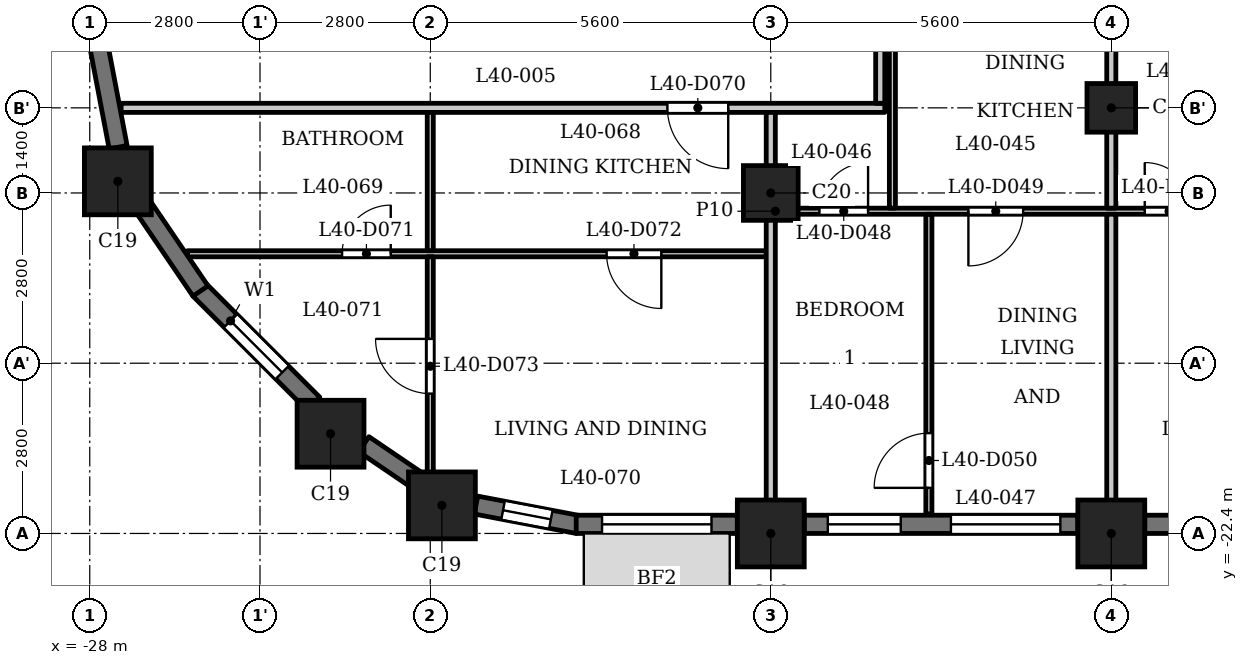
"""IFC4 building model, lengths in metres.
Left out: names, types, materials, properties, quantities, classifications, styles, units other than length and angle.
Written with IfcOpenShell. Run it as: python <this file> out.ifc"""

import sys

from ifc_helpers import new_model, si_unit, direction, frame, frame_2d, origin, origin_2d, place, context, subcontext, project, spatial, rectangle, extrude, element, fill, save


model = new_model("IFC4")
c1 = context("Model", 3, precision=1e-05, world=origin(), true_north=direction((0.0, 1.0)))
c2 = subcontext(c1, "Body", "Model", "MODEL_VIEW")
j1 = project(units=[si_unit("LENGTHUNIT", "METRE"), si_unit("PLANEANGLEUNIT", "RADIAN")], contexts=[c1])
p1 = place(None, origin())
s1 = spatial("IfcSite", under=j1, at=p1, CompositionType="ELEMENT")
p2 = place(p1, origin())
s2 = spatial("IfcBuilding", under=s1, at=p2, CompositionType="ELEMENT")
p3 = place(p2, frame((0.0, 0.0, 157.1)))
s3 = spatial("IfcBuildingStorey", under=s2, at=p3, CompositionType="ELEMENT", Elevation=157.1)
for number, where, z_axis, x_axis in (
    (1, (-22.209, -21.938, 0.0), (0.0, 0.0, 1.0), (1.0, 0.0, 0.0)),
    (2, (-16.8, -22.4, 0.0), (0.0, 0.0, 1.0), (1.0, 0.0, 0.0)),
    (3, (-11.2, -22.4, 0.0), (0.0, 0.0, 1.0), (1.0, 0.0, 0.0)),
    (4, (-27.538, -16.609, 0.0), (0.0, 0.0, 1.0), (1.0, 0.0, 0.0)),
    (5, (-24.04, -20.76, 0.0), (0.0, 0.0, 1.0), (1.0, 0.0, 0.0)),
):
    element("IfcColumn", number, at=place(p3, frame(where, z_axis=z_axis, x_axis=x_axis)), inside=s3, PredefinedType="COLUMN", context=c2, shape_type="SweptSolid", body=[
        extrude(rectangle(XDim=1.1, YDim=1.1, at=origin_2d()), origin(), (0.0, 0.0, 1.0), 3.5),
    ])
p4 = place(p3, frame((-16.8, -16.8, 0.0), z_axis=(0.0, 0.0, 1.0), x_axis=(1.0, 0.0, 0.0)))
e6 = element("IfcColumn", 6, at=p4, inside=s3, PredefinedType="COLUMN", context=c2, shape_type="SweptSolid", body=[
    extrude(rectangle(XDim=0.9, YDim=0.9, at=origin_2d()), origin(), (0.0, 0.0, 1.0), 3.5),
])
p5 = place(p3, frame((-11.2, -15.4, 0.0), z_axis=(0.0, 0.0, 1.0), x_axis=(1.0, 0.0, 0.0)))
e7 = element("IfcColumn", 7, at=p5, inside=s3, PredefinedType="COLUMN", context=c2, shape_type="SweptSolid", body=[
    extrude(rectangle(XDim=0.8, YDim=0.8, at=origin_2d()), origin(), (0.0, 0.0, 1.0), 3.5),
])
p6 = place(p3, frame((-26.197, -18.391, 0.0), z_axis=(0.0, 0.0, 1.0), x_axis=(0.707060717099, -0.707152842274, 0.0)))
e8 = element("IfcWall", 8, at=p6, inside=s3, PredefinedType="SOLIDWALL", context=c2, shape_type="SweptSolid", body=[
    extrude(rectangle(XDim=2.65, YDim=0.3, at=frame_2d((1.325, 0.0))), origin(), (0.0, 0.0, 1.0), 2.45),
])
p7 = place(p6, frame((0.725, 0.0, 0.6)))
e9 = element("IfcOpeningElement", 9, at=p7, cuts=e8, PredefinedType="OPENING", context=c2, shape_type="SweptSolid", body=[
    extrude(rectangle(XDim=1.2, YDim=1.55, at=frame_2d((0.6, 0.775))), frame((0.0, 0.16, 0.0), z_axis=(0.0, -1.0, 0.0), x_axis=(1.0, 0.0, 0.0)), (0.0, 0.0, 1.0), 0.32),
])
p8 = place(p3, frame((-23.492, -20.932, 0.0), z_axis=(0.0, 0.0, 1.0), x_axis=(0.826993959827, -0.562210806023, 0.0)))
e10 = element("IfcWall", 10, at=p8, inside=s3, PredefinedType="SOLIDWALL", context=c2, shape_type="SweptSolid", body=[
    extrude(rectangle(XDim=1.077, YDim=0.3, at=frame_2d((0.539, 0.0))), origin(), (0.0, 0.0, 1.0), 3.2),
])
p9 = place(p3, frame((-21.648, -21.933, 0.0), z_axis=(0.0, 0.0, 1.0), x_axis=(0.982297206936, -0.187329114784, 0.0)))
e11 = element("IfcWall", 11, at=p9, inside=s3, PredefinedType="SOLIDWALL", context=c2, shape_type="SweptSolid", body=[
    extrude(rectangle(XDim=1.706, YDim=0.3, at=frame_2d((0.853, 0.0))), origin(), (0.0, 0.0, 1.0), 2.45),
])
p10 = place(p9, frame((0.453, 0.0, 0.6)))
e12 = element("IfcOpeningElement", 12, at=p10, cuts=e11, PredefinedType="OPENING", context=c2, shape_type="SweptSolid", body=[
    extrude(rectangle(XDim=0.8, YDim=1.55, at=frame_2d((0.4, 0.775))), frame((0.0, 0.16, 0.0), z_axis=(0.0, -1.0, 0.0), x_axis=(1.0, 0.0, 0.0)), (0.0, 0.0, 1.0), 0.32),
])
p11 = place(p3, frame((-20.0, -22.25, 0.0), z_axis=(0.0, 0.0, 1.0), x_axis=(1.0, 0.0, 0.0)))
e13 = element("IfcWall", 13, at=p11, inside=s3, PredefinedType="SOLIDWALL", context=c2, shape_type="SweptSolid", body=[
    extrude(rectangle(XDim=2.65, YDim=0.3, at=frame_2d((1.325, 0.0))), origin(), (0.0, 0.0, 1.0), 2.45),
])
p12 = place(p11, frame((0.425, 0.0, 0.9)))
e14 = element("IfcOpeningElement", 14, at=p12, cuts=e13, PredefinedType="OPENING", context=c2, shape_type="SweptSolid", body=[
    extrude(rectangle(XDim=1.8, YDim=1.25, at=frame_2d((0.9, 0.625))), frame((0.0, 0.16, 0.0), z_axis=(0.0, -1.0, 0.0), x_axis=(1.0, 0.0, 0.0)), (0.0, 0.0, 1.0), 0.32),
])
p13 = place(p3, frame((-16.25, -22.25, 0.0), z_axis=(0.0, 0.0, 1.0), x_axis=(1.0, 0.0, 0.0)))
e15 = element("IfcWall", 15, at=p13, inside=s3, PredefinedType="SOLIDWALL", context=c2, shape_type="SweptSolid", body=[
    extrude(rectangle(XDim=4.5, YDim=0.3, at=frame_2d((2.25, 0.0))), origin(), (0.0, 0.0, 1.0), 2.45),
])
p14 = place(p13, frame((0.387, 0.0, 0.6)))
e16 = element("IfcOpeningElement", 16, at=p14, cuts=e15, PredefinedType="OPENING", context=c2, shape_type="SweptSolid", body=[
    extrude(rectangle(XDim=1.2, YDim=1.55, at=frame_2d((0.6, 0.775))), frame((0.0, 0.16, 0.0), z_axis=(0.0, -1.0, 0.0), x_axis=(1.0, 0.0, 0.0)), (0.0, 0.0, 1.0), 0.32),
])
p15 = place(p13, frame((2.413, 0.0, 0.9)))
e17 = element("IfcOpeningElement", 17, at=p15, cuts=e15, PredefinedType="OPENING", context=c2, shape_type="SweptSolid", body=[
    extrude(rectangle(XDim=1.8, YDim=1.25, at=frame_2d((0.9, 0.625))), frame((0.0, 0.16, 0.0), z_axis=(0.0, -1.0, 0.0), x_axis=(1.0, 0.0, 0.0)), (0.0, 0.0, 1.0), 0.32),
])
p16 = place(p3, frame((-10.65, -22.25, 0.0), z_axis=(0.0, 0.0, 1.0), x_axis=(1.0, 0.0, 0.0)))
e18 = element("IfcWall", 18, at=p16, inside=s3, PredefinedType="SOLIDWALL", context=c2, shape_type="SweptSolid", body=[
    extrude(rectangle(XDim=4.5, YDim=0.3, at=frame_2d((2.25, 0.0))), origin(), (0.0, 0.0, 1.0), 2.45),
])
p17 = place(p16, frame((0.45, 0.0, 1.2)))
e19 = element("IfcOpeningElement", 19, at=p17, cuts=e18, PredefinedType="OPENING", context=c2, shape_type="SweptSolid", body=[
    extrude(rectangle(XDim=3.6, YDim=0.95, at=frame_2d((1.8, 0.475))), frame((0.0, 0.16, 0.0), z_axis=(0.0, -1.0, 0.0), x_axis=(1.0, 0.0, 0.0)), (0.0, 0.0, 1.0), 0.32),
])
p18 = place(p3, frame((-27.853, -14.372, 0.0), z_axis=(0.0, 0.0, 1.0), x_axis=(0.187302784601, -0.982302227871, 0.0)))
e20 = element("IfcWall", 20, at=p18, inside=s3, PredefinedType="SOLIDWALL", context=c2, shape_type="SweptSolid", body=[
    extrude(rectangle(XDim=1.706, YDim=0.3, at=frame_2d((0.853, 0.0))), origin(), (0.0, 0.0, 1.0), 2.45),
])
p19 = place(p3, frame((-27.138, -17.002, 0.0), z_axis=(0.0, 0.0, 1.0), x_axis=(0.562075160946, -0.827086158419, 0.0)))
e21 = element("IfcWall", 21, at=p19, inside=s3, PredefinedType="SOLIDWALL", context=c2, shape_type="SweptSolid", body=[
    extrude(rectangle(XDim=1.706, YDim=0.3, at=frame_2d((0.853, 0.0))), origin(), (0.0, 0.0, 1.0), 2.45),
])
p20 = place(p3, frame((-26.394, -17.8, 0.0), z_axis=(0.0, 0.0, 1.0), x_axis=(1.0, 0.0, 0.0)))
e22 = element("IfcWall", 22, at=p20, inside=s3, PredefinedType="PARTITIONING", context=c2, shape_type="SweptSolid", body=[
    extrude(rectangle(XDim=9.519, YDim=0.1, at=frame_2d((4.76, 0.0))), origin(), (0.0, 0.0, 1.0), 3.2),
])
p21 = place(p20, frame((2.544, 0.0, 0.0)))
e23 = element("IfcOpeningElement", 23, at=p21, cuts=e22, PredefinedType="OPENING", context=c2, shape_type="SweptSolid", body=[
    extrude(rectangle(XDim=0.8, YDim=2.1, at=frame_2d((0.4, 1.05))), frame((0.0, 0.06, 0.0), z_axis=(0.0, -1.0, 0.0), x_axis=(1.0, 0.0, 0.0)), (0.0, 0.0, 1.0), 0.12),
])
p22 = place(p20, frame((6.894, 0.0, 0.0)))
e24 = element("IfcOpeningElement", 24, at=p22, cuts=e22, PredefinedType="OPENING", context=c2, shape_type="SweptSolid", body=[
    extrude(rectangle(XDim=0.9, YDim=2.1, at=frame_2d((0.45, 1.05))), frame((0.0, 0.06, 0.0), z_axis=(0.0, -1.0, 0.0), x_axis=(1.0, 0.0, 0.0)), (0.0, 0.0, 1.0), 0.12),
])
p23 = place(p3, frame((-16.725, -17.1, 0.0), z_axis=(0.0, 0.0, 1.0), x_axis=(1.0, 0.0, 0.0)))
e25 = element("IfcWall", 25, at=p23, inside=s3, PredefinedType="PARTITIONING", context=c2, shape_type="SweptSolid", body=[
    extrude(rectangle(XDim=33.45, YDim=0.1, at=frame_2d((16.725, 0.0))), origin(), (0.0, 0.0, 1.0), 3.2),
])
p24 = place(p23, frame((0.725, 0.0, 0.0)))
e26 = element("IfcOpeningElement", 26, at=p24, cuts=e25, PredefinedType="OPENING", context=c2, shape_type="SweptSolid", body=[
    extrude(rectangle(XDim=0.8, YDim=2.1, at=frame_2d((0.4, 1.05))), frame((0.0, 0.06, 0.0), z_axis=(0.0, -1.0, 0.0), x_axis=(1.0, 0.0, 0.0)), (0.0, 0.0, 1.0), 0.12),
])
p25 = place(p23, frame((3.175, 0.0, 0.0)))
e27 = element("IfcOpeningElement", 27, at=p25, cuts=e25, PredefinedType="OPENING", context=c2, shape_type="SweptSolid", body=[
    extrude(rectangle(XDim=0.9, YDim=2.1, at=frame_2d((0.45, 1.05))), frame((0.0, 0.06, 0.0), z_axis=(0.0, -1.0, 0.0), x_axis=(1.0, 0.0, 0.0)), (0.0, 0.0, 1.0), 0.12),
])
p26 = place(p23, frame((6.075, 0.0, 0.0)))
e28 = element("IfcOpeningElement", 28, at=p26, cuts=e25, PredefinedType="OPENING", context=c2, shape_type="SweptSolid", body=[
    extrude(rectangle(XDim=0.8, YDim=2.1, at=frame_2d((0.4, 1.05))), frame((0.0, 0.06, 0.0), z_axis=(0.0, -1.0, 0.0), x_axis=(1.0, 0.0, 0.0)), (0.0, 0.0, 1.0), 0.12),
])
p27 = place(p23, frame((9.425, 0.0, 0.0)))
e29 = element("IfcOpeningElement", 29, at=p27, cuts=e25, PredefinedType="OPENING", context=c2, shape_type="SweptSolid", body=[
    extrude(rectangle(XDim=0.9, YDim=2.1, at=frame_2d((0.45, 1.05))), frame((0.0, 0.06, 0.0), z_axis=(0.0, -1.0, 0.0), x_axis=(1.0, 0.0, 0.0)), (0.0, 0.0, 1.0), 0.12),
])
p28 = place(p23, frame((12.675, 0.0, 0.0)))
e30 = element("IfcOpeningElement", 30, at=p28, cuts=e25, PredefinedType="OPENING", context=c2, shape_type="SweptSolid", body=[
    extrude(rectangle(XDim=0.8, YDim=2.1, at=frame_2d((0.4, 1.05))), frame((0.0, 0.06, 0.0), z_axis=(0.0, -1.0, 0.0), x_axis=(1.0, 0.0, 0.0)), (0.0, 0.0, 1.0), 0.12),
])
p29 = place(p23, frame((15.275, 0.0, 0.0)))
e31 = element("IfcOpeningElement", 31, at=p29, cuts=e25, PredefinedType="OPENING", context=c2, shape_type="SweptSolid", body=[
    extrude(rectangle(XDim=0.9, YDim=2.1, at=frame_2d((0.45, 1.05))), frame((0.0, 0.06, 0.0), z_axis=(0.0, -1.0, 0.0), x_axis=(1.0, 0.0, 0.0)), (0.0, 0.0, 1.0), 0.12),
])
p30 = place(p23, frame((20.625, 0.0, 0.0)))
e32 = element("IfcOpeningElement", 32, at=p30, cuts=e25, PredefinedType="OPENING", context=c2, shape_type="SweptSolid", body=[
    extrude(rectangle(XDim=0.8, YDim=2.1, at=frame_2d((0.4, 1.05))), frame((0.0, 0.06, 0.0), z_axis=(0.0, -1.0, 0.0), x_axis=(1.0, 0.0, 0.0)), (0.0, 0.0, 1.0), 0.12),
])
p31 = place(p23, frame((17.375, 0.0, 0.0)))
e33 = element("IfcOpeningElement", 33, at=p31, cuts=e25, PredefinedType="OPENING", context=c2, shape_type="SweptSolid", body=[
    extrude(rectangle(XDim=0.9, YDim=2.1, at=frame_2d((0.45, 1.05))), frame((0.0, 0.06, 0.0), z_axis=(0.0, -1.0, 0.0), x_axis=(1.0, 0.0, 0.0)), (0.0, 0.0, 1.0), 0.12),
])
p32 = place(p23, frame((31.075, 0.0, 0.0)))
e34 = element("IfcOpeningElement", 34, at=p32, cuts=e25, PredefinedType="OPENING", context=c2, shape_type="SweptSolid", body=[
    extrude(rectangle(XDim=0.8, YDim=2.1, at=frame_2d((0.4, 1.05))), frame((0.0, 0.06, 0.0), z_axis=(0.0, -1.0, 0.0), x_axis=(1.0, 0.0, 0.0)), (0.0, 0.0, 1.0), 0.12),
])
p33 = place(p23, frame((29.325, 0.0, 0.0)))
e35 = element("IfcOpeningElement", 35, at=p33, cuts=e25, PredefinedType="OPENING", context=c2, shape_type="SweptSolid", body=[
    extrude(rectangle(XDim=0.9, YDim=2.1, at=frame_2d((0.45, 1.05))), frame((0.0, 0.06, 0.0), z_axis=(0.0, -1.0, 0.0), x_axis=(1.0, 0.0, 0.0)), (0.0, 0.0, 1.0), 0.12),
])
p34 = place(p23, frame((23.725, 0.0, 0.0)))
e36 = element("IfcOpeningElement", 36, at=p34, cuts=e25, PredefinedType="OPENING", context=c2, shape_type="SweptSolid", body=[
    extrude(rectangle(XDim=0.9, YDim=2.1, at=frame_2d((0.45, 1.05))), frame((0.0, 0.06, 0.0), z_axis=(0.0, -1.0, 0.0), x_axis=(1.0, 0.0, 0.0)), (0.0, 0.0, 1.0), 0.12),
])
p35 = place(p23, frame((25.775, 0.0, 0.0)))
e37 = element("IfcOpeningElement", 37, at=p35, cuts=e25, PredefinedType="OPENING", context=c2, shape_type="SweptSolid", body=[
    extrude(rectangle(XDim=0.9, YDim=2.1, at=frame_2d((0.45, 1.05))), frame((0.0, 0.06, 0.0), z_axis=(0.0, -1.0, 0.0), x_axis=(1.0, 0.0, 0.0)), (0.0, 0.0, 1.0), 0.12),
])
p36 = place(p3, frame((-27.484, -15.4, 0.0), z_axis=(0.0, 0.0, 1.0), x_axis=(1.0, 0.0, 0.0)))
e38 = element("IfcWall", 38, at=p36, inside=s3, PredefinedType="PARTITIONING", context=c2, shape_type="SweptSolid", body=[
    extrude(rectangle(XDim=12.559, YDim=0.15, at=frame_2d((6.279, 0.0))), origin(), (0.0, 0.0, 1.0), 3.2),
])
p37 = place(p36, frame((8.984, 0.0, 0.0)))
e39 = element("IfcOpeningElement", 39, at=p37, cuts=e38, PredefinedType="OPENING", context=c2, shape_type="SweptSolid", body=[
    extrude(rectangle(XDim=1.0, YDim=2.1, at=frame_2d((0.5, 1.05))), frame((0.0, 0.085, 0.0), z_axis=(0.0, -1.0, 0.0), x_axis=(1.0, 0.0, 0.0)), (0.0, 0.0, 1.0), 0.17),
])
p38 = place(p3, frame((-22.4, -21.72, 0.0), z_axis=(0.0, 0.0, 1.0), x_axis=(0.0, 1.0, 0.0)))
e40 = element("IfcWall", 40, at=p38, inside=s3, PredefinedType="PARTITIONING", context=c2, shape_type="SweptSolid", body=[
    extrude(rectangle(XDim=3.87, YDim=0.1, at=frame_2d((1.935, 0.0))), origin(), (0.0, 0.0, 1.0), 3.2),
])
p39 = place(p38, frame((1.62, 0.0, 0.0)))
e41 = element("IfcOpeningElement", 41, at=p39, cuts=e40, PredefinedType="OPENING", context=c2, shape_type="SweptSolid", body=[
    extrude(rectangle(XDim=0.9, YDim=2.1, at=frame_2d((0.45, 1.05))), frame((0.0, 0.06, 0.0), z_axis=(0.0, -1.0, 0.0), x_axis=(1.0, 0.0, 0.0)), (0.0, 0.0, 1.0), 0.12),
])
p40 = place(p3, frame((-22.4, -17.75, 0.0), z_axis=(0.0, 0.0, 1.0), x_axis=(0.0, 1.0, 0.0)))
e42 = element("IfcWall", 42, at=p40, inside=s3, PredefinedType="PARTITIONING", context=c2, shape_type="SweptSolid", body=[
    extrude(rectangle(XDim=2.275, YDim=0.1, at=frame_2d((1.137, 0.0))), origin(), (0.0, 0.0, 1.0), 3.2),
])
p41 = place(p3, frame((-16.8, -22.93, 0.0), z_axis=(0.0, 0.0, 1.0), x_axis=(0.0, 1.0, 0.0)))
e43 = element("IfcWall", 43, at=p41, inside=s3, PredefinedType="PARTITIONING", context=c2, shape_type="SweptSolid", body=[
    extrude(rectangle(XDim=7.455, YDim=0.15, at=frame_2d((3.728, 0.0))), origin(), (0.0, 0.0, 1.0), 3.2),
])
p42 = place(p3, frame((-15.0, -15.325, 0.0), z_axis=(0.0, 0.0, 1.0), x_axis=(0.0, 1.0, 0.0)))
e44 = element("IfcWall", 44, at=p42, inside=s3, PredefinedType="PARTITIONING", context=c2, shape_type="SweptSolid", body=[
    extrude(rectangle(XDim=2.05, YDim=0.15, at=frame_2d((1.025, 0.0))), origin(), (0.0, 0.0, 1.0), 3.2),
])
p43 = place(p3, frame((-14.8, -17.05, 0.0), z_axis=(0.0, 0.0, 1.0), x_axis=(0.0, 1.0, 0.0)))
e45 = element("IfcWall", 45, at=p43, inside=s3, PredefinedType="PARTITIONING", context=c2, shape_type="SweptSolid", body=[
    extrude(rectangle(XDim=3.775, YDim=0.1, at=frame_2d((1.888, 0.0))), origin(), (0.0, 0.0, 1.0), 3.2),
])
p44 = place(p3, frame((-14.2, -22.08, 0.0), z_axis=(0.0, 0.0, 1.0), x_axis=(0.0, 1.0, 0.0)))
e46 = element("IfcWall", 46, at=p44, inside=s3, PredefinedType="PARTITIONING", context=c2, shape_type="SweptSolid", body=[
    extrude(rectangle(XDim=4.93, YDim=0.1, at=frame_2d((2.465, 0.0))), origin(), (0.0, 0.0, 1.0), 3.2),
])
p45 = place(p44, frame((0.43, 0.0, 0.0)))
e47 = element("IfcOpeningElement", 47, at=p45, cuts=e46, PredefinedType="OPENING", context=c2, shape_type="SweptSolid", body=[
    extrude(rectangle(XDim=0.9, YDim=2.1, at=frame_2d((0.45, 1.05))), frame((0.0, 0.06, 0.0), z_axis=(0.0, -1.0, 0.0), x_axis=(1.0, 0.0, 0.0)), (0.0, 0.0, 1.0), 0.12),
])
p46 = place(p3, frame((-11.2, -22.93, 0.0), z_axis=(0.0, 0.0, 1.0), x_axis=(0.0, 1.0, 0.0)))
e48 = element("IfcWall", 48, at=p46, inside=s3, PredefinedType="PARTITIONING", context=c2, shape_type="SweptSolid", body=[
    extrude(rectangle(XDim=5.78, YDim=0.15, at=frame_2d((2.89, 0.0))), origin(), (0.0, 0.0, 1.0), 3.2),
])
p47 = place(p3, frame((-11.2, -17.05, 0.0), z_axis=(0.0, 0.0, 1.0), x_axis=(0.0, 1.0, 0.0)))
e49 = element("IfcWall", 49, at=p47, inside=s3, PredefinedType="PARTITIONING", context=c2, shape_type="SweptSolid", body=[
    extrude(rectangle(XDim=3.775, YDim=0.15, at=frame_2d((1.888, 0.0))), origin(), (0.0, 0.0, 1.0), 3.2),
])
p48 = place(p24, origin())
e50 = element("IfcDoor", 50, at=p48, inside=s3, OperationType="SINGLE_SWING_LEFT", PredefinedType="DOOR", context=c2, shape_type="SweptSolid", body=[
    extrude(rectangle(XDim=0.8, YDim=2.1, at=frame_2d((0.4, 1.05))), frame((0.0, 0.025, 0.0), z_axis=(0.0, -1.0, 0.0), x_axis=(1.0, 0.0, 0.0)), (0.0, 0.0, 1.0), 0.05),
])
fill(e26, e50)
p49 = place(p25, origin())
e51 = element("IfcDoor", 51, at=p49, inside=s3, OperationType="SINGLE_SWING_LEFT", PredefinedType="DOOR", context=c2, shape_type="SweptSolid", body=[
    extrude(rectangle(XDim=0.9, YDim=2.1, at=frame_2d((0.45, 1.05))), frame((0.0, 0.025, 0.0), z_axis=(0.0, -1.0, 0.0), x_axis=(1.0, 0.0, 0.0)), (0.0, 0.0, 1.0), 0.05),
])
fill(e27, e51)
p50 = place(p45, origin())
e52 = element("IfcDoor", 52, at=p50, inside=s3, OperationType="SINGLE_SWING_RIGHT", PredefinedType="DOOR", context=c2, shape_type="SweptSolid", body=[
    extrude(rectangle(XDim=0.9, YDim=2.1, at=frame_2d((0.45, 1.05))), frame((0.0, 0.025, 0.0), z_axis=(0.0, -1.0, 0.0), x_axis=(1.0, 0.0, 0.0)), (0.0, 0.0, 1.0), 0.05),
])
fill(e47, e52)
p51 = place(p26, origin())
e53 = element("IfcDoor", 53, at=p51, inside=s3, OperationType="SINGLE_SWING_RIGHT", PredefinedType="DOOR", context=c2, shape_type="SweptSolid", body=[
    extrude(rectangle(XDim=0.8, YDim=2.1, at=frame_2d((0.4, 1.05))), frame((0.0, 0.025, 0.0), z_axis=(0.0, -1.0, 0.0), x_axis=(1.0, 0.0, 0.0)), (0.0, 0.0, 1.0), 0.05),
])
fill(e28, e53)
p52 = place(p37, origin())
e54 = element("IfcDoor", 54, at=p52, inside=s3, OperationType="SINGLE_SWING_RIGHT", PredefinedType="DOOR", context=c2, shape_type="SweptSolid", body=[
    extrude(rectangle(XDim=1.0, YDim=2.1, at=frame_2d((0.5, 1.05))), frame((0.0, 0.025, 0.0), z_axis=(0.0, -1.0, 0.0), x_axis=(1.0, 0.0, 0.0)), (0.0, 0.0, 1.0), 0.05),
])
fill(e39, e54)
p53 = place(p21, origin())
e55 = element("IfcDoor", 55, at=p53, inside=s3, OperationType="SINGLE_SWING_LEFT", PredefinedType="DOOR", context=c2, shape_type="SweptSolid", body=[
    extrude(rectangle(XDim=0.8, YDim=2.1, at=frame_2d((0.4, 1.05))), frame((0.0, 0.025, 0.0), z_axis=(0.0, -1.0, 0.0), x_axis=(1.0, 0.0, 0.0)), (0.0, 0.0, 1.0), 0.05),
])
fill(e23, e55)
p54 = place(p22, origin())
e56 = element("IfcDoor", 56, at=p54, inside=s3, OperationType="SINGLE_SWING_RIGHT", PredefinedType="DOOR", context=c2, shape_type="SweptSolid", body=[
    extrude(rectangle(XDim=0.9, YDim=2.1, at=frame_2d((0.45, 1.05))), frame((0.0, 0.025, 0.0), z_axis=(0.0, -1.0, 0.0), x_axis=(1.0, 0.0, 0.0)), (0.0, 0.0, 1.0), 0.05),
])
fill(e24, e56)
p55 = place(p39, origin())
e57 = element("IfcDoor", 57, at=p55, inside=s3, OperationType="SINGLE_SWING_LEFT", PredefinedType="DOOR", context=c2, shape_type="SweptSolid", body=[
    extrude(rectangle(XDim=0.9, YDim=2.1, at=frame_2d((0.45, 1.05))), frame((0.0, 0.025, 0.0), z_axis=(0.0, -1.0, 0.0), x_axis=(1.0, 0.0, 0.0)), (0.0, 0.0, 1.0), 0.05),
])
fill(e41, e57)
p56 = place(p7, origin())
e58 = element("IfcWindow", 58, at=p56, inside=s3, PartitioningType="SINGLE_PANEL", PredefinedType="WINDOW", context=c2, shape_type="SweptSolid", body=[
    extrude(rectangle(XDim=1.2, YDim=1.55, at=frame_2d((0.6, 0.775))), frame((0.0, 0.03, 0.0), z_axis=(0.0, -1.0, 0.0), x_axis=(1.0, 0.0, 0.0)), (0.0, 0.0, 1.0), 0.06),
])
fill(e9, e58)
p57 = place(p10, origin())
e59 = element("IfcWindow", 59, at=p57, inside=s3, PartitioningType="SINGLE_PANEL", PredefinedType="WINDOW", context=c2, shape_type="SweptSolid", body=[
    extrude(rectangle(XDim=0.8, YDim=1.55, at=frame_2d((0.4, 0.775))), frame((0.0, 0.03, 0.0), z_axis=(0.0, -1.0, 0.0), x_axis=(1.0, 0.0, 0.0)), (0.0, 0.0, 1.0), 0.06),
])
fill(e12, e59)
p58 = place(p12, origin())
e60 = element("IfcWindow", 60, at=p58, inside=s3, PartitioningType="SINGLE_PANEL", PredefinedType="WINDOW", context=c2, shape_type="SweptSolid", body=[
    extrude(rectangle(XDim=1.8, YDim=1.25, at=frame_2d((0.9, 0.625))), frame((0.0, 0.03, 0.0), z_axis=(0.0, -1.0, 0.0), x_axis=(1.0, 0.0, 0.0)), (0.0, 0.0, 1.0), 0.06),
])
fill(e14, e60)
p59 = place(p14, origin())
e61 = element("IfcWindow", 61, at=p59, inside=s3, PartitioningType="SINGLE_PANEL", PredefinedType="WINDOW", context=c2, shape_type="SweptSolid", body=[
    extrude(rectangle(XDim=1.2, YDim=1.55, at=frame_2d((0.6, 0.775))), frame((0.0, 0.03, 0.0), z_axis=(0.0, -1.0, 0.0), x_axis=(1.0, 0.0, 0.0)), (0.0, 0.0, 1.0), 0.06),
])
fill(e16, e61)
p60 = place(p15, origin())
e62 = element("IfcWindow", 62, at=p60, inside=s3, PartitioningType="SINGLE_PANEL", PredefinedType="WINDOW", context=c2, shape_type="SweptSolid", body=[
    extrude(rectangle(XDim=1.8, YDim=1.25, at=frame_2d((0.9, 0.625))), frame((0.0, 0.03, 0.0), z_axis=(0.0, -1.0, 0.0), x_axis=(1.0, 0.0, 0.0)), (0.0, 0.0, 1.0), 0.06),
])
fill(e17, e62)
save(model, sys.argv[1])
